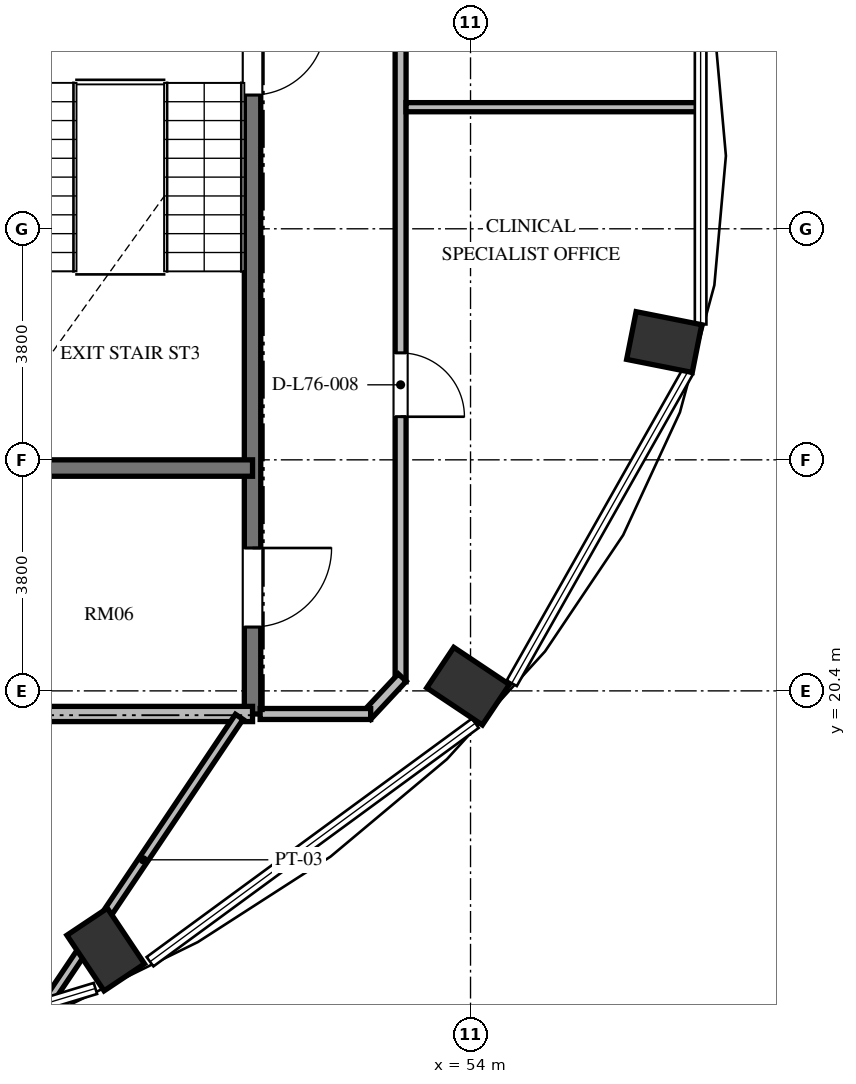
"""IFC4 building model, lengths in metres.
Left out: names, types, materials, properties, quantities, classifications, styles, units other than length and angle.
Written with IfcOpenShell. Run it as: python <this file> out.ifc"""

import sys

from ifc_helpers import new_model, si_unit, direction, frame, frame_2d, origin, origin_2d, place, context, subcontext, project, spatial, rectangle, extrude, element, fill, save


model = new_model("IFC4")
c1 = context("Model", 3, precision=1e-05, world=origin(), true_north=direction((0.0, 1.0)))
c2 = subcontext(c1, "Body", "Model", "MODEL_VIEW")
j1 = project(units=[si_unit("LENGTHUNIT", "METRE"), si_unit("PLANEANGLEUNIT", "RADIAN")], contexts=[c1])
p1 = place(None, origin())
s1 = spatial("IfcSite", under=j1, at=p1, CompositionType="ELEMENT")
p2 = place(p1, origin())
s2 = spatial("IfcBuilding", under=s1, at=p2, CompositionType="ELEMENT")
p3 = place(p2, frame((0.0, 0.0, 291.504)))
s3 = spatial("IfcBuildingStorey", under=s2, at=p3, CompositionType="ELEMENT", Elevation=291.504)
for number, where, z_axis, x_axis in (
    (1, (48.0, 16.146, 0.0), (0.0, 0.0, 1.0), (0.556, -0.831, 0.0)),
    (2, (53.96, 20.478, 0.0), (0.0, 0.0, 1.0), (0.831, -0.556, 0.0)),
    (3, (57.185, 26.137, 0.0), (0.0, 0.0, 1.0), (0.981, -0.195, 0.0)),
):
    element("IfcColumn", number, at=place(p3, frame(where, z_axis=z_axis, x_axis=x_axis)), inside=s3, PredefinedType="COLUMN", context=c2, shape_type="SweptSolid", body=[
        extrude(rectangle(XDim=1.1, YDim=0.8, at=origin_2d()), origin(), (0.0, 0.0, 1.0), 3.648),
    ])
p4 = place(p3, frame((50.415, 35.845, 0.0), z_axis=(0.0, 0.0, 1.0), x_axis=(0.0, -1.0, 0.0)))
e4 = element("IfcWall", 4, at=p4, inside=s3, PredefinedType="SHEAR", context=c2, shape_type="SweptSolid", body=[
    extrude(rectangle(XDim=15.825, YDim=0.27, at=frame_2d((7.913, 0.0))), origin(), (0.0, 0.0, 1.0), 3.648),
])
p5 = place(p4, frame((4.445, 0.0, 0.0)))
e5 = element("IfcOpeningElement", 5, at=p5, cuts=e4, PredefinedType="OPENING", context=c2, shape_type="SweptSolid", body=[
    extrude(rectangle(XDim=1.2, YDim=2.15, at=frame_2d((0.6, 1.075))), frame((0.0, 0.145, 0.0), z_axis=(0.0, -1.0, 0.0), x_axis=(1.0, 0.0, 0.0)), (0.0, 0.0, 1.0), 0.29),
])
p6 = place(p4, frame((1.295, 0.0, 0.0)))
e6 = element("IfcOpeningElement", 6, at=p6, cuts=e4, PredefinedType="OPENING", context=c2, shape_type="SweptSolid", body=[
    extrude(rectangle(XDim=1.3, YDim=2.2, at=frame_2d((0.65, 1.1))), frame((0.0, 0.145, 0.0), z_axis=(0.0, -1.0, 0.0), x_axis=(1.0, 0.0, 0.0)), (0.0, 0.0, 1.0), 0.29),
])
p7 = place(p4, frame((13.095, 0.0, 0.0)))
e7 = element("IfcOpeningElement", 7, at=p7, cuts=e4, PredefinedType="OPENING", context=c2, shape_type="SweptSolid", body=[
    extrude(rectangle(XDim=1.3, YDim=2.2, at=frame_2d((0.65, 1.1))), frame((0.0, 0.145, 0.0), z_axis=(0.0, -1.0, 0.0), x_axis=(1.0, 0.0, 0.0)), (0.0, 0.0, 1.0), 0.29),
])
p8 = place(p3, frame((45.7, 24.065, 0.0), z_axis=(0.0, 0.0, 1.0), x_axis=(1.0, 0.0, 0.0)))
e8 = element("IfcWall", 8, at=p8, inside=s3, PredefinedType="SHEAR", context=c2, shape_type="SweptSolid", body=[
    extrude(rectangle(XDim=4.715, YDim=0.27, at=frame_2d((2.357, 0.0))), origin(), (0.0, 0.0, 1.0), 3.648),
])
p9 = place(p3, frame((45.7, 20.02, 0.0), z_axis=(0.0, 0.0, 1.0), x_axis=(1.0, 0.0, 0.0)))
e9 = element("IfcWall", 9, at=p9, inside=s3, PredefinedType="SOLIDWALL", context=c2, shape_type="SweptSolid", body=[
    extrude(rectangle(XDim=4.715, YDim=0.25, at=frame_2d((2.357, 0.0))), origin(), (0.0, 0.0, 1.0), 3.448),
])
p10 = place(p3, frame((52.85, 37.85, 0.0), z_axis=(0.0, 0.0, 1.0), x_axis=(0.0, -1.0, 0.0)))
e10 = element("IfcWall", 10, at=p10, inside=s3, PredefinedType="PARTITIONING", context=c2, shape_type="SweptSolid", body=[
    extrude(rectangle(XDim=17.3, YDim=0.18, at=frame_2d((8.65, 0.0))), origin(), (0.0, 0.0, 1.0), 3.448),
])
p11 = place(p10, frame((11.891, 0.0, 0.0)))
e11 = element("IfcOpeningElement", 11, at=p11, cuts=e10, PredefinedType="OPENING", context=c2, shape_type="SweptSolid", body=[
    extrude(rectangle(XDim=1.05, YDim=2.15, at=frame_2d((0.525, 1.075))), frame((0.0, 0.1, 0.0), z_axis=(0.0, -1.0, 0.0), x_axis=(1.0, 0.0, 0.0)), (0.0, 0.0, 1.0), 0.2),
])
p12 = place(p3, frame((52.877, 20.619, 0.0), z_axis=(0.0, 0.0, 1.0), x_axis=(-0.682409308253, -0.730970270264, 0.0)))
e12 = element("IfcWall", 12, at=p12, inside=s3, PredefinedType="PARTITIONING", context=c2, shape_type="SweptSolid", body=[
    extrude(rectangle(XDim=0.86, YDim=0.18, at=frame_2d((0.43, 0.0))), origin(), (0.0, 0.0, 1.0), 3.448),
])
p13 = place(p3, frame((52.358, 20.02, 0.0), z_axis=(0.0, 0.0, 1.0), x_axis=(-1.0, 0.0, 0.0)))
e13 = element("IfcWall", 13, at=p13, inside=s3, PredefinedType="PARTITIONING", context=c2, shape_type="SweptSolid", body=[
    extrude(rectangle(XDim=1.818, YDim=0.18, at=frame_2d((0.909, 0.0))), origin(), (0.0, 0.0, 1.0), 3.448),
])
p14 = place(p3, frame((52.94, 30.0, 0.0), z_axis=(0.0, 0.0, 1.0), x_axis=(1.0, 0.0, 0.0)))
e14 = element("IfcWall", 14, at=p14, inside=s3, PredefinedType="PARTITIONING", context=c2, shape_type="SweptSolid", body=[
    extrude(rectangle(XDim=4.832, YDim=0.15, at=frame_2d((2.416, 0.0))), origin(), (0.0, 0.0, 1.0), 3.448),
])
p15 = place(p3, frame((50.196, 19.973, 0.0), z_axis=(0.0, 0.0, 1.0), x_axis=(-0.557432490255, -0.830222270725, 0.0)))
e15 = element("IfcWall", 15, at=p15, inside=s3, PredefinedType="PARTITIONING", context=c2, shape_type="SweptSolid", body=[
    extrude(rectangle(XDim=5.664, YDim=0.15, at=frame_2d((2.832, 0.0))), origin(), (0.0, 0.0, 1.0), 3.448),
])
p16 = place(p5, origin())
e16 = element("IfcDoor", 16, at=p16, inside=s3, OperationType="SINGLE_SWING_LEFT", PredefinedType="DOOR", context=c2, shape_type="SweptSolid", body=[
    extrude(rectangle(XDim=1.2, YDim=2.15, at=frame_2d((0.6, 1.075))), frame((0.0, 0.025, 0.0), z_axis=(0.0, -1.0, 0.0), x_axis=(1.0, 0.0, 0.0)), (0.0, 0.0, 1.0), 0.05),
])
fill(e5, e16)
p17 = place(p7, origin())
e17 = element("IfcDoor", 17, at=p17, inside=s3, OperationType="SINGLE_SWING_LEFT", PredefinedType="DOOR", context=c2, shape_type="SweptSolid", body=[
    extrude(rectangle(XDim=1.3, YDim=2.2, at=frame_2d((0.65, 1.1))), frame((0.0, 0.025, 0.0), z_axis=(0.0, -1.0, 0.0), x_axis=(1.0, 0.0, 0.0)), (0.0, 0.0, 1.0), 0.05),
])
fill(e7, e17)
p18 = place(p11, origin())
e18 = element("IfcDoor", 18, at=p18, inside=s3, OperationType="SINGLE_SWING_RIGHT", PredefinedType="DOOR", context=c2, shape_type="SweptSolid", body=[
    extrude(rectangle(XDim=1.05, YDim=2.15, at=frame_2d((0.525, 1.075))), frame((0.0, 0.025, 0.0), z_axis=(0.0, -1.0, 0.0), x_axis=(1.0, 0.0, 0.0)), (0.0, 0.0, 1.0), 0.05),
])
fill(e11, e18)
save(model, sys.argv[1])
